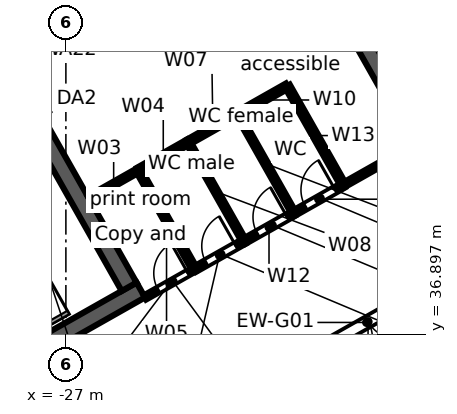
"""IFC4 building model, lengths in metres.
Left out: names, types, materials, properties, quantities, classifications, styles, units other than length and angle.
Written with IfcOpenShell. Run it as: python <this file> out.ifc"""

import sys

from ifc_helpers import new_model, si_unit, direction, frame, frame_2d, origin, place, context, subcontext, project, spatial, rectangle, extrude, element, fill, save


model = new_model("IFC4")
c1 = context("Model", 3, precision=1e-05, world=origin(), true_north=direction((0.0, 1.0)))
c2 = subcontext(c1, "Body", "Model", "MODEL_VIEW")
j1 = project(units=[si_unit("LENGTHUNIT", "METRE"), si_unit("PLANEANGLEUNIT", "RADIAN")], contexts=[c1])
p1 = place(None, origin())
s1 = spatial("IfcSite", under=j1, at=p1, CompositionType="ELEMENT")
p2 = place(p1, origin())
s2 = spatial("IfcBuilding", under=s1, at=p2, CompositionType="ELEMENT")
p3 = place(p2, frame((0.0, 0.0, 254.3)))
s3 = spatial("IfcBuildingStorey", under=s2, at=p3, CompositionType="ELEMENT", Elevation=254.3)
p4 = place(p3, frame((-0.046, 47.974, 0.0), z_axis=(0.0, 0.0, 1.0), x_axis=(-0.870356579543, -0.492421998337, 0.0)))
e1 = element("IfcWall", 1, at=p4, inside=s3, PredefinedType="STANDARD", context=c2, shape_type="SweptSolid", body=[
    extrude(rectangle(XDim=43.754, YDim=0.25, at=frame_2d((21.877, 0.0))), origin(), (0.0, 0.0, 1.0), 3.55),
])
p5 = place(p4, frame((41.061, 0.0, 0.8)))
e2 = element("IfcOpeningElement", 2, at=p5, cuts=e1, PredefinedType="OPENING", context=c2, shape_type="SweptSolid", body=[
    extrude(rectangle(XDim=2.4, YDim=2.2, at=frame_2d((1.2, 1.1))), frame((0.0, 0.135, 0.0), z_axis=(0.0, -1.0, 0.0), x_axis=(1.0, 0.0, 0.0)), (0.0, 0.0, 1.0), 0.27),
])
p6 = place(p4, frame((38.443, 0.0, 0.0)))
e3 = element("IfcOpeningElement", 3, at=p6, cuts=e1, PredefinedType="OPENING", context=c2, shape_type="SweptSolid", body=[
    extrude(rectangle(XDim=1.8, YDim=2.4, at=frame_2d((0.9, 1.2))), frame((0.0, 0.135, 0.0), z_axis=(0.0, -1.0, 0.0), x_axis=(1.0, 0.0, 0.0)), (0.0, 0.0, 1.0), 0.27),
])
p7 = place(p4, frame((35.225, 0.0, 0.8)))
e4 = element("IfcOpeningElement", 4, at=p7, cuts=e1, PredefinedType="OPENING", context=c2, shape_type="SweptSolid", body=[
    extrude(rectangle(XDim=2.4, YDim=2.2, at=frame_2d((1.2, 1.1))), frame((0.0, 0.135, 0.0), z_axis=(0.0, -1.0, 0.0), x_axis=(1.0, 0.0, 0.0)), (0.0, 0.0, 1.0), 0.27),
])
p8 = place(p4, frame((32.307, 0.0, 0.8)))
e5 = element("IfcOpeningElement", 5, at=p8, cuts=e1, PredefinedType="OPENING", context=c2, shape_type="SweptSolid", body=[
    extrude(rectangle(XDim=2.4, YDim=2.2, at=frame_2d((1.2, 1.1))), frame((0.0, 0.135, 0.0), z_axis=(0.0, -1.0, 0.0), x_axis=(1.0, 0.0, 0.0)), (0.0, 0.0, 1.0), 0.27),
])
p9 = place(p4, frame((29.688, 0.0, 0.0)))
e6 = element("IfcOpeningElement", 6, at=p9, cuts=e1, PredefinedType="OPENING", context=c2, shape_type="SweptSolid", body=[
    extrude(rectangle(XDim=1.8, YDim=2.4, at=frame_2d((0.9, 1.2))), frame((0.0, 0.135, 0.0), z_axis=(0.0, -1.0, 0.0), x_axis=(1.0, 0.0, 0.0)), (0.0, 0.0, 1.0), 0.27),
])
p10 = place(p4, frame((26.47, 0.0, 0.8)))
e7 = element("IfcOpeningElement", 7, at=p10, cuts=e1, PredefinedType="OPENING", context=c2, shape_type="SweptSolid", body=[
    extrude(rectangle(XDim=2.4, YDim=2.2, at=frame_2d((1.2, 1.1))), frame((0.0, 0.135, 0.0), z_axis=(0.0, -1.0, 0.0), x_axis=(1.0, 0.0, 0.0)), (0.0, 0.0, 1.0), 0.27),
])
p11 = place(p4, frame((23.552, 0.0, 0.8)))
e8 = element("IfcOpeningElement", 8, at=p11, cuts=e1, PredefinedType="OPENING", context=c2, shape_type="SweptSolid", body=[
    extrude(rectangle(XDim=2.4, YDim=2.2, at=frame_2d((1.2, 1.1))), frame((0.0, 0.135, 0.0), z_axis=(0.0, -1.0, 0.0), x_axis=(1.0, 0.0, 0.0)), (0.0, 0.0, 1.0), 0.27),
])
p12 = place(p4, frame((20.934, 0.0, 0.0)))
e9 = element("IfcOpeningElement", 9, at=p12, cuts=e1, PredefinedType="OPENING", context=c2, shape_type="SweptSolid", body=[
    extrude(rectangle(XDim=1.8, YDim=2.4, at=frame_2d((0.9, 1.2))), frame((0.0, 0.135, 0.0), z_axis=(0.0, -1.0, 0.0), x_axis=(1.0, 0.0, 0.0)), (0.0, 0.0, 1.0), 0.27),
])
p13 = place(p4, frame((17.716, 0.0, 0.8)))
e10 = element("IfcOpeningElement", 10, at=p13, cuts=e1, PredefinedType="OPENING", context=c2, shape_type="SweptSolid", body=[
    extrude(rectangle(XDim=2.4, YDim=2.2, at=frame_2d((1.2, 1.1))), frame((0.0, 0.135, 0.0), z_axis=(0.0, -1.0, 0.0), x_axis=(1.0, 0.0, 0.0)), (0.0, 0.0, 1.0), 0.27),
])
p14 = place(p4, frame((14.798, 0.0, 0.8)))
e11 = element("IfcOpeningElement", 11, at=p14, cuts=e1, PredefinedType="OPENING", context=c2, shape_type="SweptSolid", body=[
    extrude(rectangle(XDim=2.4, YDim=2.2, at=frame_2d((1.2, 1.1))), frame((0.0, 0.135, 0.0), z_axis=(0.0, -1.0, 0.0), x_axis=(1.0, 0.0, 0.0)), (0.0, 0.0, 1.0), 0.27),
])
p15 = place(p4, frame((12.179, 0.0, 0.0)))
e12 = element("IfcOpeningElement", 12, at=p15, cuts=e1, PredefinedType="OPENING", context=c2, shape_type="SweptSolid", body=[
    extrude(rectangle(XDim=1.8, YDim=2.4, at=frame_2d((0.9, 1.2))), frame((0.0, 0.135, 0.0), z_axis=(0.0, -1.0, 0.0), x_axis=(1.0, 0.0, 0.0)), (0.0, 0.0, 1.0), 0.27),
])
p16 = place(p4, frame((8.961, 0.0, 0.8)))
e13 = element("IfcOpeningElement", 13, at=p16, cuts=e1, PredefinedType="OPENING", context=c2, shape_type="SweptSolid", body=[
    extrude(rectangle(XDim=2.4, YDim=2.2, at=frame_2d((1.2, 1.1))), frame((0.0, 0.135, 0.0), z_axis=(0.0, -1.0, 0.0), x_axis=(1.0, 0.0, 0.0)), (0.0, 0.0, 1.0), 0.27),
])
p17 = place(p4, frame((6.043, 0.0, 0.8)))
e14 = element("IfcOpeningElement", 14, at=p17, cuts=e1, PredefinedType="OPENING", context=c2, shape_type="SweptSolid", body=[
    extrude(rectangle(XDim=2.4, YDim=2.2, at=frame_2d((1.2, 1.1))), frame((0.0, 0.135, 0.0), z_axis=(0.0, -1.0, 0.0), x_axis=(1.0, 0.0, 0.0)), (0.0, 0.0, 1.0), 0.27),
])
p18 = place(p4, frame((3.425, 0.0, 0.0)))
e15 = element("IfcOpeningElement", 15, at=p18, cuts=e1, PredefinedType="OPENING", context=c2, shape_type="SweptSolid", body=[
    extrude(rectangle(XDim=1.8, YDim=2.4, at=frame_2d((0.9, 1.2))), frame((0.0, 0.135, 0.0), z_axis=(0.0, -1.0, 0.0), x_axis=(1.0, 0.0, 0.0)), (0.0, 0.0, 1.0), 0.27),
])
p19 = place(p4, frame((0.207, 0.0, 0.8)))
e16 = element("IfcOpeningElement", 16, at=p19, cuts=e1, PredefinedType="OPENING", context=c2, shape_type="SweptSolid", body=[
    extrude(rectangle(XDim=2.4, YDim=2.2, at=frame_2d((1.2, 1.1))), frame((0.0, 0.135, 0.0), z_axis=(0.0, -1.0, 0.0), x_axis=(1.0, 0.0, 0.0)), (0.0, 0.0, 1.0), 0.27),
])
p20 = place(p3, frame((-58.732, 38.771, 0.0), z_axis=(0.0, 0.0, 1.0), x_axis=(0.870354824205, 0.492425100887, 0.0)))
e17 = element("IfcWall", 17, at=p20, inside=s3, PredefinedType="STANDARD", context=c2, shape_type="SweptSolid", body=[
    extrude(rectangle(XDim=64.006, YDim=0.25, at=frame_2d((32.003, 0.0))), origin(), (0.0, 0.0, 1.0), 3.55),
])
p21 = place(p20, frame((61.259, 0.0, 0.8)))
e18 = element("IfcOpeningElement", 18, at=p21, cuts=e17, PredefinedType="OPENING", context=c2, shape_type="SweptSolid", body=[
    extrude(rectangle(XDim=2.4, YDim=2.2, at=frame_2d((1.2, 1.1))), frame((0.0, 0.135, 0.0), z_axis=(0.0, -1.0, 0.0), x_axis=(1.0, 0.0, 0.0)), (0.0, 0.0, 1.0), 0.27),
])
p22 = place(p20, frame((58.216, 0.0, 0.8)))
e19 = element("IfcOpeningElement", 19, at=p22, cuts=e17, PredefinedType="OPENING", context=c2, shape_type="SweptSolid", body=[
    extrude(rectangle(XDim=2.4, YDim=2.2, at=frame_2d((1.2, 1.1))), frame((0.0, 0.135, 0.0), z_axis=(0.0, -1.0, 0.0), x_axis=(1.0, 0.0, 0.0)), (0.0, 0.0, 1.0), 0.27),
])
p23 = place(p20, frame((55.173, 0.0, 0.8)))
e20 = element("IfcOpeningElement", 20, at=p23, cuts=e17, PredefinedType="OPENING", context=c2, shape_type="SweptSolid", body=[
    extrude(rectangle(XDim=2.4, YDim=2.2, at=frame_2d((1.2, 1.1))), frame((0.0, 0.135, 0.0), z_axis=(0.0, -1.0, 0.0), x_axis=(1.0, 0.0, 0.0)), (0.0, 0.0, 1.0), 0.27),
])
p24 = place(p20, frame((52.129, 0.0, 0.8)))
e21 = element("IfcOpeningElement", 21, at=p24, cuts=e17, PredefinedType="OPENING", context=c2, shape_type="SweptSolid", body=[
    extrude(rectangle(XDim=2.4, YDim=2.2, at=frame_2d((1.2, 1.1))), frame((0.0, 0.135, 0.0), z_axis=(0.0, -1.0, 0.0), x_axis=(1.0, 0.0, 0.0)), (0.0, 0.0, 1.0), 0.27),
])
p25 = place(p20, frame((49.086, 0.0, 0.8)))
e22 = element("IfcOpeningElement", 22, at=p25, cuts=e17, PredefinedType="OPENING", context=c2, shape_type="SweptSolid", body=[
    extrude(rectangle(XDim=2.4, YDim=2.2, at=frame_2d((1.2, 1.1))), frame((0.0, 0.135, 0.0), z_axis=(0.0, -1.0, 0.0), x_axis=(1.0, 0.0, 0.0)), (0.0, 0.0, 1.0), 0.27),
])
p26 = place(p20, frame((46.043, 0.0, 0.8)))
e23 = element("IfcOpeningElement", 23, at=p26, cuts=e17, PredefinedType="OPENING", context=c2, shape_type="SweptSolid", body=[
    extrude(rectangle(XDim=2.4, YDim=2.2, at=frame_2d((1.2, 1.1))), frame((0.0, 0.135, 0.0), z_axis=(0.0, -1.0, 0.0), x_axis=(1.0, 0.0, 0.0)), (0.0, 0.0, 1.0), 0.27),
])
p27 = place(p20, frame((43.0, 0.0, 0.8)))
e24 = element("IfcOpeningElement", 24, at=p27, cuts=e17, PredefinedType="OPENING", context=c2, shape_type="SweptSolid", body=[
    extrude(rectangle(XDim=2.4, YDim=2.2, at=frame_2d((1.2, 1.1))), frame((0.0, 0.135, 0.0), z_axis=(0.0, -1.0, 0.0), x_axis=(1.0, 0.0, 0.0)), (0.0, 0.0, 1.0), 0.27),
])
p28 = place(p20, frame((39.956, 0.0, 0.8)))
e25 = element("IfcOpeningElement", 25, at=p28, cuts=e17, PredefinedType="OPENING", context=c2, shape_type="SweptSolid", body=[
    extrude(rectangle(XDim=2.4, YDim=2.2, at=frame_2d((1.2, 1.1))), frame((0.0, 0.135, 0.0), z_axis=(0.0, -1.0, 0.0), x_axis=(1.0, 0.0, 0.0)), (0.0, 0.0, 1.0), 0.27),
])
p29 = place(p20, frame((36.913, 0.0, 0.8)))
e26 = element("IfcOpeningElement", 26, at=p29, cuts=e17, PredefinedType="OPENING", context=c2, shape_type="SweptSolid", body=[
    extrude(rectangle(XDim=2.4, YDim=2.2, at=frame_2d((1.2, 1.1))), frame((0.0, 0.135, 0.0), z_axis=(0.0, -1.0, 0.0), x_axis=(1.0, 0.0, 0.0)), (0.0, 0.0, 1.0), 0.27),
])
p30 = place(p20, frame((33.87, 0.0, 0.8)))
e27 = element("IfcOpeningElement", 27, at=p30, cuts=e17, PredefinedType="OPENING", context=c2, shape_type="SweptSolid", body=[
    extrude(rectangle(XDim=2.4, YDim=2.2, at=frame_2d((1.2, 1.1))), frame((0.0, 0.135, 0.0), z_axis=(0.0, -1.0, 0.0), x_axis=(1.0, 0.0, 0.0)), (0.0, 0.0, 1.0), 0.27),
])
p31 = place(p20, frame((30.826, 0.0, 0.8)))
e28 = element("IfcOpeningElement", 28, at=p31, cuts=e17, PredefinedType="OPENING", context=c2, shape_type="SweptSolid", body=[
    extrude(rectangle(XDim=2.4, YDim=2.2, at=frame_2d((1.2, 1.1))), frame((0.0, 0.135, 0.0), z_axis=(0.0, -1.0, 0.0), x_axis=(1.0, 0.0, 0.0)), (0.0, 0.0, 1.0), 0.27),
])
p32 = place(p20, frame((27.783, 0.0, 0.8)))
e29 = element("IfcOpeningElement", 29, at=p32, cuts=e17, PredefinedType="OPENING", context=c2, shape_type="SweptSolid", body=[
    extrude(rectangle(XDim=2.4, YDim=2.2, at=frame_2d((1.2, 1.1))), frame((0.0, 0.135, 0.0), z_axis=(0.0, -1.0, 0.0), x_axis=(1.0, 0.0, 0.0)), (0.0, 0.0, 1.0), 0.27),
])
p33 = place(p20, frame((24.74, 0.0, 0.8)))
e30 = element("IfcOpeningElement", 30, at=p33, cuts=e17, PredefinedType="OPENING", context=c2, shape_type="SweptSolid", body=[
    extrude(rectangle(XDim=2.4, YDim=2.2, at=frame_2d((1.2, 1.1))), frame((0.0, 0.135, 0.0), z_axis=(0.0, -1.0, 0.0), x_axis=(1.0, 0.0, 0.0)), (0.0, 0.0, 1.0), 0.27),
])
p34 = place(p20, frame((21.696, 0.0, 0.8)))
e31 = element("IfcOpeningElement", 31, at=p34, cuts=e17, PredefinedType="OPENING", context=c2, shape_type="SweptSolid", body=[
    extrude(rectangle(XDim=2.4, YDim=2.2, at=frame_2d((1.2, 1.1))), frame((0.0, 0.135, 0.0), z_axis=(0.0, -1.0, 0.0), x_axis=(1.0, 0.0, 0.0)), (0.0, 0.0, 1.0), 0.27),
])
p35 = place(p20, frame((18.653, 0.0, 0.8)))
e32 = element("IfcOpeningElement", 32, at=p35, cuts=e17, PredefinedType="OPENING", context=c2, shape_type="SweptSolid", body=[
    extrude(rectangle(XDim=2.4, YDim=2.2, at=frame_2d((1.2, 1.1))), frame((0.0, 0.135, 0.0), z_axis=(0.0, -1.0, 0.0), x_axis=(1.0, 0.0, 0.0)), (0.0, 0.0, 1.0), 0.27),
])
p36 = place(p20, frame((15.61, 0.0, 0.8)))
e33 = element("IfcOpeningElement", 33, at=p36, cuts=e17, PredefinedType="OPENING", context=c2, shape_type="SweptSolid", body=[
    extrude(rectangle(XDim=2.4, YDim=2.2, at=frame_2d((1.2, 1.1))), frame((0.0, 0.135, 0.0), z_axis=(0.0, -1.0, 0.0), x_axis=(1.0, 0.0, 0.0)), (0.0, 0.0, 1.0), 0.27),
])
p37 = place(p20, frame((12.567, 0.0, 0.8)))
e34 = element("IfcOpeningElement", 34, at=p37, cuts=e17, PredefinedType="OPENING", context=c2, shape_type="SweptSolid", body=[
    extrude(rectangle(XDim=2.4, YDim=2.2, at=frame_2d((1.2, 1.1))), frame((0.0, 0.135, 0.0), z_axis=(0.0, -1.0, 0.0), x_axis=(1.0, 0.0, 0.0)), (0.0, 0.0, 1.0), 0.27),
])
p38 = place(p20, frame((9.523, 0.0, 0.8)))
e35 = element("IfcOpeningElement", 35, at=p38, cuts=e17, PredefinedType="OPENING", context=c2, shape_type="SweptSolid", body=[
    extrude(rectangle(XDim=2.4, YDim=2.2, at=frame_2d((1.2, 1.1))), frame((0.0, 0.135, 0.0), z_axis=(0.0, -1.0, 0.0), x_axis=(1.0, 0.0, 0.0)), (0.0, 0.0, 1.0), 0.27),
])
p39 = place(p20, frame((6.48, 0.0, 0.8)))
e36 = element("IfcOpeningElement", 36, at=p39, cuts=e17, PredefinedType="OPENING", context=c2, shape_type="SweptSolid", body=[
    extrude(rectangle(XDim=2.4, YDim=2.2, at=frame_2d((1.2, 1.1))), frame((0.0, 0.135, 0.0), z_axis=(0.0, -1.0, 0.0), x_axis=(1.0, 0.0, 0.0)), (0.0, 0.0, 1.0), 0.27),
])
p40 = place(p20, frame((3.437, 0.0, 0.8)))
e37 = element("IfcOpeningElement", 37, at=p40, cuts=e17, PredefinedType="OPENING", context=c2, shape_type="SweptSolid", body=[
    extrude(rectangle(XDim=2.4, YDim=2.2, at=frame_2d((1.2, 1.1))), frame((0.0, 0.135, 0.0), z_axis=(0.0, -1.0, 0.0), x_axis=(1.0, 0.0, 0.0)), (0.0, 0.0, 1.0), 0.27),
])
p41 = place(p20, frame((0.393, 0.0, 0.8)))
e38 = element("IfcOpeningElement", 38, at=p41, cuts=e17, PredefinedType="OPENING", context=c2, shape_type="SweptSolid", body=[
    extrude(rectangle(XDim=2.4, YDim=2.2, at=frame_2d((1.2, 1.1))), frame((0.0, 0.135, 0.0), z_axis=(0.0, -1.0, 0.0), x_axis=(1.0, 0.0, 0.0)), (0.0, 0.0, 1.0), 0.27),
])
p42 = place(p3, frame((-39.825, 29.684, 0.0), z_axis=(0.0, 0.0, 1.0), x_axis=(0.870353598469, 0.492427267353, 0.0)))
e39 = element("IfcWall", 39, at=p42, inside=s3, PredefinedType="SOLIDWALL", context=c2, shape_type="SweptSolid", body=[
    extrude(rectangle(XDim=17.0, YDim=0.45, at=frame_2d((8.5, 0.0))), origin(), (0.0, 0.0, 1.0), 3.55),
])
p43 = place(p42, frame((7.2, 0.0, 0.0)))
e40 = element("IfcOpeningElement", 40, at=p43, cuts=e39, PredefinedType="OPENING", context=c2, shape_type="SweptSolid", body=[
    extrude(rectangle(XDim=1.2, YDim=2.1, at=frame_2d((0.6, 1.05))), frame((0.0, 0.235, 0.0), z_axis=(0.0, -1.0, 0.0), x_axis=(1.0, 0.0, 0.0)), (0.0, 0.0, 1.0), 0.47),
])
p44 = place(p3, frame((-31.787, 49.542, 0.0), z_axis=(0.0, 0.0, 1.0), x_axis=(0.492421378713, -0.870356930107, 0.0)))
e41 = element("IfcWall", 41, at=p44, inside=s3, PredefinedType="SOLIDWALL", context=c2, shape_type="SweptSolid", body=[
    extrude(rectangle(XDim=13.1, YDim=0.45, at=frame_2d((6.55, 0.0))), origin(), (0.0, 0.0, 1.0), 3.55),
])
p45 = place(p3, frame((-24.353, 53.747, 0.0), z_axis=(0.0, 0.0, 1.0), x_axis=(0.492435496286, -0.870348942665, 0.0)))
e42 = element("IfcWall", 42, at=p45, inside=s3, PredefinedType="SOLIDWALL", context=c2, shape_type="SweptSolid", body=[
    extrude(rectangle(XDim=13.1, YDim=0.45, at=frame_2d((6.55, 0.0))), origin(), (0.0, 0.0, 1.0), 3.55),
])
p46 = place(p3, frame((-26.396, 40.47, 0.0), z_axis=(0.0, 0.0, 1.0), x_axis=(0.870308175411, 0.492507542899, 0.0)))
e43 = element("IfcWall", 43, at=p46, inside=s3, PredefinedType="PARTITIONING", context=c2, shape_type="SweptSolid", body=[
    extrude(rectangle(XDim=1.5, YDim=0.125, at=frame_2d((0.75, 0.0))), origin(), (0.0, 0.0, 1.0), 2.722),
])
p47 = place(p3, frame((-25.09, 41.209, 0.0), z_axis=(0.0, 0.0, 1.0), x_axis=(0.870468812868, 0.492223573008, 0.0)))
e44 = element("IfcWall", 44, at=p47, inside=s3, PredefinedType="PARTITIONING", context=c2, shape_type="SweptSolid", body=[
    extrude(rectangle(XDim=1.5, YDim=0.15, at=frame_2d((0.75, 0.0))), origin(), (0.0, 0.0, 1.0), 3.55),
])
p48 = place(p3, frame((-25.09, 41.209, 0.0), z_axis=(0.0, 0.0, 1.0), x_axis=(0.492365617434, -0.870388475779, 0.0)))
e45 = element("IfcWall", 45, at=p48, inside=s3, PredefinedType="PARTITIONING", context=c2, shape_type="SweptSolid", body=[
    extrude(rectangle(XDim=3.0, YDim=0.15, at=frame_2d((1.5, 0.0))), origin(), (0.0, 0.0, 1.0), 3.55),
])
p49 = place(p3, frame((-24.919, 37.859, 0.0), z_axis=(0.0, 0.0, 1.0), x_axis=(0.870308175411, 0.492507542899, 0.0)))
e46 = element("IfcWall", 46, at=p49, inside=s3, PredefinedType="PARTITIONING", context=c2, shape_type="SweptSolid", body=[
    extrude(rectangle(XDim=1.5, YDim=0.125, at=frame_2d((0.75, 0.0))), origin(), (0.0, 0.0, 1.0), 2.722),
])
p50 = place(p49, frame((0.4, 0.0, 0.0)))
e47 = element("IfcOpeningElement", 47, at=p50, cuts=e46, PredefinedType="OPENING", context=c2, shape_type="SweptSolid", body=[
    extrude(rectangle(XDim=0.9, YDim=2.1, at=frame_2d((0.45, 1.05))), frame((0.0, 0.073, 0.0), z_axis=(0.0, -1.0, 0.0), x_axis=(1.0, 0.0, 0.0)), (0.0, 0.0, 1.0), 0.145),
])
p51 = place(p3, frame((-23.785, 41.947, 0.0), z_axis=(0.0, 0.0, 1.0), x_axis=(0.870308175411, 0.492507542899, 0.0)))
e48 = element("IfcWall", 48, at=p51, inside=s3, PredefinedType="PARTITIONING", context=c2, shape_type="SweptSolid", body=[
    extrude(rectangle(XDim=1.5, YDim=0.15, at=frame_2d((0.75, 0.0))), origin(), (0.0, 0.0, 1.0), 3.55),
])
p52 = place(p3, frame((-23.785, 41.947, 0.0), z_axis=(0.0, 0.0, 1.0), x_axis=(0.492303960105, -0.870423351516, 0.0)))
e49 = element("IfcWall", 49, at=p52, inside=s3, PredefinedType="PARTITIONING", context=c2, shape_type="SweptSolid", body=[
    extrude(rectangle(XDim=3.0, YDim=0.125, at=frame_2d((1.5, 0.0))), origin(), (0.0, 0.0, 1.0), 3.55),
])
p53 = place(p3, frame((-23.613, 38.598, 0.0), z_axis=(0.0, 0.0, 1.0), x_axis=(0.870429354291, 0.492293346683, 0.0)))
e50 = element("IfcWall", 50, at=p53, inside=s3, PredefinedType="PARTITIONING", context=c2, shape_type="SweptSolid", body=[
    extrude(rectangle(XDim=1.499, YDim=0.15, at=frame_2d((0.75, 0.0))), origin(), (0.0, 0.0, 1.0), 3.55),
])
p54 = place(p53, frame((0.35, 0.0, 0.0)))
e51 = element("IfcOpeningElement", 51, at=p54, cuts=e50, PredefinedType="OPENING", context=c2, shape_type="SweptSolid", body=[
    extrude(rectangle(XDim=0.9, YDim=2.1, at=frame_2d((0.45, 1.05))), frame((0.0, 0.085, 0.0), z_axis=(0.0, -1.0, 0.0), x_axis=(1.0, 0.0, 0.0)), (0.0, 0.0, 1.0), 0.17),
])
p55 = place(p3, frame((-22.479, 42.686, 0.0), z_axis=(0.0, 0.0, 1.0), x_axis=(0.870150176056, 0.492786638526, 0.0)))
e52 = element("IfcWall", 52, at=p55, inside=s3, PredefinedType="PARTITIONING", context=c2, shape_type="SweptSolid", body=[
    extrude(rectangle(XDim=1.5, YDim=0.15, at=frame_2d((0.75, 0.0))), origin(), (0.0, 0.0, 1.0), 3.55),
])
p56 = place(p3, frame((-22.479, 42.686, 0.0), z_axis=(0.0, 0.0, 1.0), x_axis=(0.492365617434, -0.870388475779, 0.0)))
e53 = element("IfcWall", 53, at=p56, inside=s3, PredefinedType="PARTITIONING", context=c2, shape_type="SweptSolid", body=[
    extrude(rectangle(XDim=3.0, YDim=0.125, at=frame_2d((1.5, 0.0))), origin(), (0.0, 0.0, 1.0), 3.55),
])
p57 = place(p3, frame((-22.308, 39.336, 0.0), z_axis=(0.0, 0.0, 1.0), x_axis=(0.870347633314, 0.492437810475, 0.0)))
e54 = element("IfcWall", 54, at=p57, inside=s3, PredefinedType="PARTITIONING", context=c2, shape_type="SweptSolid", body=[
    extrude(rectangle(XDim=1.501, YDim=0.15, at=frame_2d((0.75, 0.0))), origin(), (0.0, 0.0, 1.0), 3.55),
])
p58 = place(p57, frame((0.4, 0.0, 0.0)))
e55 = element("IfcOpeningElement", 55, at=p58, cuts=e54, PredefinedType="OPENING", context=c2, shape_type="SweptSolid", body=[
    extrude(rectangle(XDim=0.9, YDim=2.1, at=frame_2d((0.45, 1.05))), frame((0.0, 0.085, 0.0), z_axis=(0.0, -1.0, 0.0), x_axis=(1.0, 0.0, 0.0)), (0.0, 0.0, 1.0), 0.17),
])
p59 = place(p3, frame((-21.174, 43.425, 0.0), z_axis=(0.0, 0.0, 1.0), x_axis=(0.492365617434, -0.870388475779, 0.0)))
e56 = element("IfcWall", 56, at=p59, inside=s3, PredefinedType="PARTITIONING", context=c2, shape_type="SweptSolid", body=[
    extrude(rectangle(XDim=3.0, YDim=0.15, at=frame_2d((1.5, 0.0))), origin(), (0.0, 0.0, 1.0), 3.55),
])
p60 = place(p3, frame((-21.002, 40.075, 0.0), z_axis=(0.0, 0.0, 1.0), x_axis=(0.870150176056, 0.492786638526, 0.0)))
e57 = element("IfcWall", 57, at=p60, inside=s3, PredefinedType="PARTITIONING", context=c2, shape_type="SweptSolid", body=[
    extrude(rectangle(XDim=1.5, YDim=0.15, at=frame_2d((0.75, 0.0))), origin(), (0.0, 0.0, 1.0), 3.55),
])
p61 = place(p60, frame((0.35, 0.0, 0.0)))
e58 = element("IfcOpeningElement", 58, at=p61, cuts=e57, PredefinedType="OPENING", context=c2, shape_type="SweptSolid", body=[
    extrude(rectangle(XDim=0.9, YDim=2.1, at=frame_2d((0.45, 1.05))), frame((0.0, 0.085, 0.0), z_axis=(0.0, -1.0, 0.0), x_axis=(1.0, 0.0, 0.0)), (0.0, 0.0, 1.0), 0.17),
])
p62 = place(p3, frame((-19.697, 40.814, 0.0), z_axis=(0.0, 0.0, 1.0), x_axis=(0.870497588791, 0.492172680986, 0.0)))
e59 = element("IfcWall", 59, at=p62, inside=s3, PredefinedType="PARTITIONING", context=c2, shape_type="SweptSolid", body=[
    extrude(rectangle(XDim=2.091, YDim=0.125, at=frame_2d((1.045, 0.0))), origin(), (0.0, 0.0, 1.0), 3.55),
])
p63 = place(p12, origin())
e60 = element("IfcDoor", 60, at=p63, inside=s3, OperationType="DOUBLE_DOOR_SINGLE_SWING", PredefinedType="DOOR", context=c2, shape_type="SweptSolid", body=[
    extrude(rectangle(XDim=1.8, YDim=2.4, at=frame_2d((0.9, 1.2))), frame((0.0, 0.025, 0.0), z_axis=(0.0, -1.0, 0.0), x_axis=(1.0, 0.0, 0.0)), (0.0, 0.0, 1.0), 0.05),
])
fill(e9, e60)
p64 = place(p50, origin())
e61 = element("IfcDoor", 61, at=p64, inside=s3, OperationType="SINGLE_SWING_RIGHT", PredefinedType="DOOR", context=c2, shape_type="SweptSolid", body=[
    extrude(rectangle(XDim=0.9, YDim=2.1, at=frame_2d((0.45, 1.05))), frame((0.0, 0.025, 0.0), z_axis=(0.0, -1.0, 0.0), x_axis=(1.0, 0.0, 0.0)), (0.0, 0.0, 1.0), 0.05),
])
fill(e47, e61)
p65 = place(p54, origin())
e62 = element("IfcDoor", 62, at=p65, inside=s3, OperationType="SINGLE_SWING_RIGHT", PredefinedType="DOOR", context=c2, shape_type="SweptSolid", body=[
    extrude(rectangle(XDim=0.9, YDim=2.1, at=frame_2d((0.45, 1.05))), frame((0.0, 0.025, 0.0), z_axis=(0.0, -1.0, 0.0), x_axis=(1.0, 0.0, 0.0)), (0.0, 0.0, 1.0), 0.05),
])
fill(e51, e62)
p66 = place(p58, origin())
e63 = element("IfcDoor", 63, at=p66, inside=s3, OperationType="SINGLE_SWING_RIGHT", PredefinedType="DOOR", context=c2, shape_type="SweptSolid", body=[
    extrude(rectangle(XDim=0.9, YDim=2.1, at=frame_2d((0.45, 1.05))), frame((0.0, 0.025, 0.0), z_axis=(0.0, -1.0, 0.0), x_axis=(1.0, 0.0, 0.0)), (0.0, 0.0, 1.0), 0.05),
])
fill(e55, e63)
p67 = place(p61, origin())
e64 = element("IfcDoor", 64, at=p67, inside=s3, OperationType="SINGLE_SWING_RIGHT", PredefinedType="DOOR", context=c2, shape_type="SweptSolid", body=[
    extrude(rectangle(XDim=0.9, YDim=2.1, at=frame_2d((0.45, 1.05))), frame((0.0, 0.025, 0.0), z_axis=(0.0, -1.0, 0.0), x_axis=(1.0, 0.0, 0.0)), (0.0, 0.0, 1.0), 0.05),
])
fill(e58, e64)
save(model, sys.argv[1])
